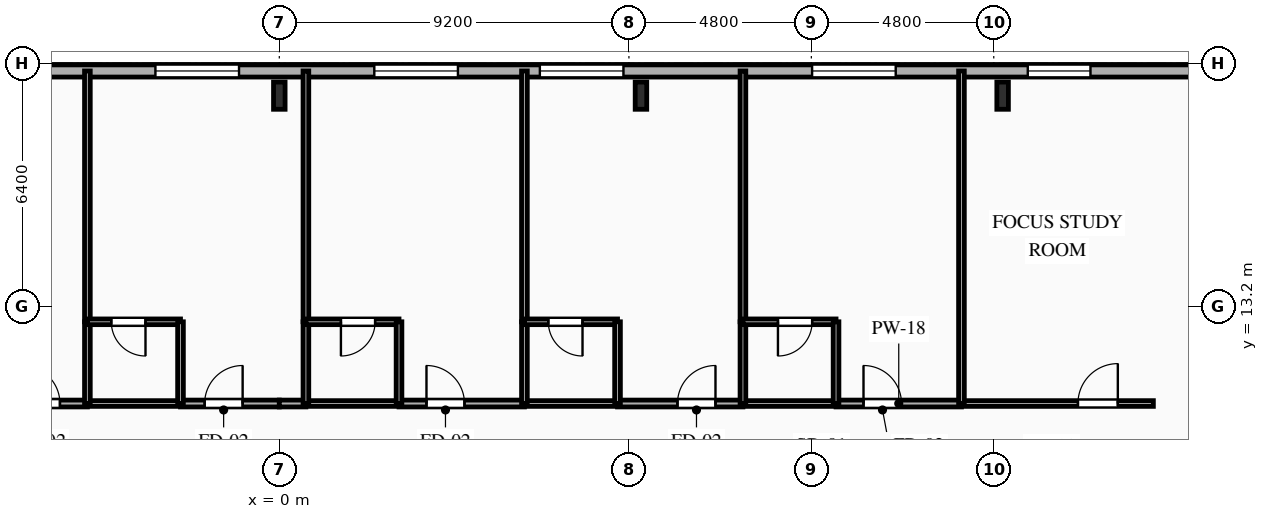
"""IFC4 building model, lengths in metres.
Left out: names, types, materials, properties, quantities, classifications, styles, units other than length and angle.
Written with IfcOpenShell. Run it as: python <this file> out.ifc"""

import sys

from ifc_helpers import new_model, si_unit, direction, frame, frame_2d, origin, origin_2d, place, context, subcontext, project, spatial, rectangle, i_section, extrude, element, fill, save


model = new_model("IFC4")
c1 = context("Model", 3, precision=1e-05, world=origin(), true_north=direction((0.0, 1.0)))
c2 = subcontext(c1, "Body", "Model", "MODEL_VIEW")
j1 = project(units=[si_unit("LENGTHUNIT", "METRE"), si_unit("PLANEANGLEUNIT", "RADIAN")], contexts=[c1])
p1 = place(None, origin())
s1 = spatial("IfcSite", under=j1, at=p1, CompositionType="ELEMENT")
p2 = place(p1, origin())
s2 = spatial("IfcBuilding", under=s1, at=p2, CompositionType="ELEMENT")
p3 = place(p2, frame((0.0, 0.0, 57.15)))
s3 = spatial("IfcBuildingStorey", under=s2, at=p3, CompositionType="ELEMENT", Elevation=57.15)
for number, where, z_axis, x_axis in (
    (1, (19.033, 18.75, 0.0), (0.0, 0.0, 1.0), (1.0, 0.0, 0.0)),
    (2, (9.517, 18.75, 0.0), (0.0, 0.0, 1.0), (1.0, 0.0, 0.0)),
    (3, (0.0, 18.75, 0.0), (0.0, 0.0, 1.0), (1.0, 0.0, 0.0)),
):
    element("IfcColumn", number, at=place(p3, frame(where, z_axis=z_axis, x_axis=x_axis)), inside=s3, PredefinedType="COLUMN", context=c2, shape_type="SweptSolid", body=[
        extrude(i_section(OverallWidth=0.304, OverallDepth=0.716, WebThickness=0.021, FlangeThickness=0.04, FilletRadius=0.027, at=origin_2d()), origin(), (0.0, 0.0, 1.0), 3.35),
    ])
p4 = place(p3, frame((-29.2, 19.4, 0.0), z_axis=(0.0, 0.0, 1.0), x_axis=(1.0, 0.0, 0.0)))
e4 = element("IfcWall", 4, at=p4, inside=s3, PredefinedType="SOLIDWALL", context=c2, shape_type="SweptSolid", body=[
    extrude(rectangle(XDim=58.4, YDim=0.32, at=frame_2d((29.2, 0.0))), origin(), (0.0, 0.0, 1.0), 3.035),
])
p5 = place(p4, frame((8.065, 0.0, 0.85)))
e5 = element("IfcOpeningElement", 5, at=p5, cuts=e4, PredefinedType="OPENING", context=c2, shape_type="SweptSolid", body=[
    extrude(rectangle(XDim=1.65, YDim=1.85, at=frame_2d((0.825, 0.925))), frame((0.0, 0.17, 0.0), z_axis=(0.0, -1.0, 0.0), x_axis=(1.0, 0.0, 0.0)), (0.0, 0.0, 1.0), 0.34),
])
p6 = place(p4, frame((15.92, 0.0, 0.85)))
e6 = element("IfcOpeningElement", 6, at=p6, cuts=e4, PredefinedType="OPENING", context=c2, shape_type="SweptSolid", body=[
    extrude(rectangle(XDim=1.6, YDim=1.85, at=frame_2d((0.8, 0.925))), frame((0.0, 0.17, 0.0), z_axis=(0.0, -1.0, 0.0), x_axis=(1.0, 0.0, 0.0)), (0.0, 0.0, 1.0), 0.34),
])
p7 = place(p4, frame((20.18, 0.0, 0.85)))
e7 = element("IfcOpeningElement", 7, at=p7, cuts=e4, PredefinedType="OPENING", context=c2, shape_type="SweptSolid", body=[
    extrude(rectangle(XDim=2.2, YDim=1.85, at=frame_2d((1.1, 0.925))), frame((0.0, 0.17, 0.0), z_axis=(0.0, -1.0, 0.0), x_axis=(1.0, 0.0, 0.0)), (0.0, 0.0, 1.0), 0.34),
])
p8 = place(p4, frame((25.94, 0.0, 0.85)))
e8 = element("IfcOpeningElement", 8, at=p8, cuts=e4, PredefinedType="OPENING", context=c2, shape_type="SweptSolid", body=[
    extrude(rectangle(XDim=2.2, YDim=1.85, at=frame_2d((1.1, 0.925))), frame((0.0, 0.17, 0.0), z_axis=(0.0, -1.0, 0.0), x_axis=(1.0, 0.0, 0.0)), (0.0, 0.0, 1.0), 0.34),
])
p9 = place(p4, frame((31.7, 0.0, 0.85)))
e9 = element("IfcOpeningElement", 9, at=p9, cuts=e4, PredefinedType="OPENING", context=c2, shape_type="SweptSolid", body=[
    extrude(rectangle(XDim=2.2, YDim=1.85, at=frame_2d((1.1, 0.925))), frame((0.0, 0.17, 0.0), z_axis=(0.0, -1.0, 0.0), x_axis=(1.0, 0.0, 0.0)), (0.0, 0.0, 1.0), 0.34),
])
p10 = place(p4, frame((36.056, 0.0, 0.85)))
e10 = element("IfcOpeningElement", 10, at=p10, cuts=e4, PredefinedType="OPENING", context=c2, shape_type="SweptSolid", body=[
    extrude(rectangle(XDim=2.2, YDim=1.85, at=frame_2d((1.1, 0.925))), frame((0.0, 0.17, 0.0), z_axis=(0.0, -1.0, 0.0), x_axis=(1.0, 0.0, 0.0)), (0.0, 0.0, 1.0), 0.34),
])
p11 = place(p4, frame((43.22, 0.0, 0.85)))
e11 = element("IfcOpeningElement", 11, at=p11, cuts=e4, PredefinedType="OPENING", context=c2, shape_type="SweptSolid", body=[
    extrude(rectangle(XDim=2.2, YDim=1.85, at=frame_2d((1.1, 0.925))), frame((0.0, 0.17, 0.0), z_axis=(0.0, -1.0, 0.0), x_axis=(1.0, 0.0, 0.0)), (0.0, 0.0, 1.0), 0.34),
])
p12 = place(p4, frame((48.895, 0.0, 0.85)))
e12 = element("IfcOpeningElement", 12, at=p12, cuts=e4, PredefinedType="OPENING", context=c2, shape_type="SweptSolid", body=[
    extrude(rectangle(XDim=1.65, YDim=1.85, at=frame_2d((0.825, 0.925))), frame((0.0, 0.17, 0.0), z_axis=(0.0, -1.0, 0.0), x_axis=(1.0, 0.0, 0.0)), (0.0, 0.0, 1.0), 0.34),
])
p13 = place(p3, frame((-8.35, 10.65, 0.0), z_axis=(0.0, 0.0, 1.0), x_axis=(1.0, 0.0, 0.0)))
e13 = element("IfcWall", 13, at=p13, inside=s3, PredefinedType="PARTITIONING", context=c2, shape_type="SweptSolid", body=[
    extrude(rectangle(XDim=3.3, YDim=0.18, at=frame_2d((1.65, 0.0))), origin(), (0.0, 0.0, 1.0), 3.035),
])
p14 = place(p13, frame((1.577, 0.0, 0.0)))
e14 = element("IfcOpeningElement", 14, at=p14, cuts=e13, PredefinedType="OPENING", context=c2, shape_type="SweptSolid", body=[
    extrude(rectangle(XDim=1.0, YDim=2.15, at=frame_2d((0.5, 1.075))), frame((0.0, 0.1, 0.0), z_axis=(0.0, -1.0, 0.0), x_axis=(1.0, 0.0, 0.0)), (0.0, 0.0, 1.0), 0.2),
])
p15 = place(p3, frame((-2.6, 10.65, 0.0), z_axis=(0.0, 0.0, 1.0), x_axis=(1.0, 0.0, 0.0)))
e15 = element("IfcWall", 15, at=p15, inside=s3, PredefinedType="PARTITIONING", context=c2, shape_type="SweptSolid", body=[
    extrude(rectangle(XDim=2.6, YDim=0.18, at=frame_2d((1.3, 0.0))), origin(), (0.0, 0.0, 1.0), 3.035),
])
p16 = place(p15, frame((0.635, 0.0, 0.0)))
e16 = element("IfcOpeningElement", 16, at=p16, cuts=e15, PredefinedType="OPENING", context=c2, shape_type="SweptSolid", body=[
    extrude(rectangle(XDim=1.0, YDim=2.15, at=frame_2d((0.5, 1.075))), frame((0.0, 0.1, 0.0), z_axis=(0.0, -1.0, 0.0), x_axis=(1.0, 0.0, 0.0)), (0.0, 0.0, 1.0), 0.2),
])
p17 = place(p3, frame((-5.05, 10.65, 0.0), z_axis=(0.0, 0.0, 1.0), x_axis=(1.0, 0.0, 0.0)))
e17 = element("IfcWall", 17, at=p17, inside=s3, PredefinedType="PLUMBINGWALL", context=c2, shape_type="SweptSolid", body=[
    extrude(rectangle(XDim=2.45, YDim=0.15, at=frame_2d((1.225, 0.0))), origin(), (0.0, 0.0, 1.0), 3.035),
])
p18 = place(p3, frame((0.0, 10.65, 0.0), z_axis=(0.0, 0.0, 1.0), x_axis=(1.0, 0.0, 0.0)))
e18 = element("IfcWall", 18, at=p18, inside=s3, PredefinedType="PARTITIONING", context=c2, shape_type="SweptSolid", body=[
    extrude(rectangle(XDim=0.7, YDim=0.18, at=frame_2d((0.35, 0.0))), origin(), (0.0, 0.0, 1.0), 3.035),
])
p19 = place(p3, frame((3.15, 10.65, 0.0), z_axis=(0.0, 0.0, 1.0), x_axis=(1.0, 0.0, 0.0)))
e19 = element("IfcWall", 19, at=p19, inside=s3, PredefinedType="PARTITIONING", context=c2, shape_type="SweptSolid", body=[
    extrude(rectangle(XDim=3.3, YDim=0.18, at=frame_2d((1.65, 0.0))), origin(), (0.0, 0.0, 1.0), 3.035),
])
p20 = place(p19, frame((0.722, 0.0, 0.0)))
e20 = element("IfcOpeningElement", 20, at=p20, cuts=e19, PredefinedType="OPENING", context=c2, shape_type="SweptSolid", body=[
    extrude(rectangle(XDim=1.0, YDim=2.15, at=frame_2d((0.5, 1.075))), frame((0.0, 0.1, 0.0), z_axis=(0.0, -1.0, 0.0), x_axis=(1.0, 0.0, 0.0)), (0.0, 0.0, 1.0), 0.2),
])
p21 = place(p3, frame((0.7, 10.65, 0.0), z_axis=(0.0, 0.0, 1.0), x_axis=(1.0, 0.0, 0.0)))
e21 = element("IfcWall", 21, at=p21, inside=s3, PredefinedType="PLUMBINGWALL", context=c2, shape_type="SweptSolid", body=[
    extrude(rectangle(XDim=2.45, YDim=0.15, at=frame_2d((1.225, 0.0))), origin(), (0.0, 0.0, 1.0), 3.035),
])
p22 = place(p3, frame((8.9, 10.65, 0.0), z_axis=(0.0, 0.0, 1.0), x_axis=(1.0, 0.0, 0.0)))
e22 = element("IfcWall", 22, at=p22, inside=s3, PredefinedType="PARTITIONING", context=c2, shape_type="SweptSolid", body=[
    extrude(rectangle(XDim=3.3, YDim=0.18, at=frame_2d((1.65, 0.0))), origin(), (0.0, 0.0, 1.0), 3.035),
])
p23 = place(p22, frame((1.577, 0.0, 0.0)))
e23 = element("IfcOpeningElement", 23, at=p23, cuts=e22, PredefinedType="OPENING", context=c2, shape_type="SweptSolid", body=[
    extrude(rectangle(XDim=1.0, YDim=2.15, at=frame_2d((0.5, 1.075))), frame((0.0, 0.1, 0.0), z_axis=(0.0, -1.0, 0.0), x_axis=(1.0, 0.0, 0.0)), (0.0, 0.0, 1.0), 0.2),
])
p24 = place(p3, frame((6.45, 10.65, 0.0), z_axis=(0.0, 0.0, 1.0), x_axis=(1.0, 0.0, 0.0)))
e24 = element("IfcWall", 24, at=p24, inside=s3, PredefinedType="PLUMBINGWALL", context=c2, shape_type="SweptSolid", body=[
    extrude(rectangle(XDim=2.45, YDim=0.15, at=frame_2d((1.225, 0.0))), origin(), (0.0, 0.0, 1.0), 3.035),
])
p25 = place(p3, frame((14.65, 10.65, 0.0), z_axis=(0.0, 0.0, 1.0), x_axis=(1.0, 0.0, 0.0)))
e25 = element("IfcWall", 25, at=p25, inside=s3, PredefinedType="PARTITIONING", context=c2, shape_type="SweptSolid", body=[
    extrude(rectangle(XDim=3.3, YDim=0.18, at=frame_2d((1.65, 0.0))), origin(), (0.0, 0.0, 1.0), 3.035),
])
p26 = place(p25, frame((0.722, 0.0, 0.0)))
e26 = element("IfcOpeningElement", 26, at=p26, cuts=e25, PredefinedType="OPENING", context=c2, shape_type="SweptSolid", body=[
    extrude(rectangle(XDim=1.0, YDim=2.15, at=frame_2d((0.5, 1.075))), frame((0.0, 0.1, 0.0), z_axis=(0.0, -1.0, 0.0), x_axis=(1.0, 0.0, 0.0)), (0.0, 0.0, 1.0), 0.2),
])
p27 = place(p3, frame((12.2, 10.65, 0.0), z_axis=(0.0, 0.0, 1.0), x_axis=(1.0, 0.0, 0.0)))
e27 = element("IfcWall", 27, at=p27, inside=s3, PredefinedType="PLUMBINGWALL", context=c2, shape_type="SweptSolid", body=[
    extrude(rectangle(XDim=2.45, YDim=0.15, at=frame_2d((1.225, 0.0))), origin(), (0.0, 0.0, 1.0), 3.035),
])
p28 = place(p3, frame((17.95, 10.65, 0.0), z_axis=(0.0, 0.0, 1.0), x_axis=(1.0, 0.0, 0.0)))
e28 = element("IfcWall", 28, at=p28, inside=s3, PredefinedType="PARTITIONING", context=c2, shape_type="SweptSolid", body=[
    extrude(rectangle(XDim=5.05, YDim=0.15, at=frame_2d((2.525, 0.0))), origin(), (0.0, 0.0, 1.0), 3.035),
])
p29 = place(p28, frame((3.065, 0.0, 0.0)))
e29 = element("IfcOpeningElement", 29, at=p29, cuts=e28, PredefinedType="OPENING", context=c2, shape_type="SweptSolid", body=[
    extrude(rectangle(XDim=1.05, YDim=2.15, at=frame_2d((0.525, 1.075))), frame((0.0, 0.085, 0.0), z_axis=(0.0, -1.0, 0.0), x_axis=(1.0, 0.0, 0.0)), (0.0, 0.0, 1.0), 0.17),
])
p30 = place(p3, frame((-5.05, 19.4, 0.0), z_axis=(0.0, 0.0, 1.0), x_axis=(0.0, -1.0, 0.0)))
e30 = element("IfcWall", 30, at=p30, inside=s3, PredefinedType="PARTITIONING", context=c2, shape_type="SweptSolid", body=[
    extrude(rectangle(XDim=6.6, YDim=0.15, at=frame_2d((3.3, 0.0))), origin(), (0.0, 0.0, 1.0), 3.035),
])
p31 = place(p3, frame((-5.05, 12.8, 0.0), z_axis=(0.0, 0.0, 1.0), x_axis=(0.0, -1.0, 0.0)))
e31 = element("IfcWall", 31, at=p31, inside=s3, PredefinedType="PLUMBINGWALL", context=c2, shape_type="SweptSolid", body=[
    extrude(rectangle(XDim=2.15, YDim=0.15, at=frame_2d((1.075, 0.0))), origin(), (0.0, 0.0, 1.0), 3.035),
])
p32 = place(p3, frame((-2.6, 12.8, 0.0), z_axis=(0.0, 0.0, 1.0), x_axis=(-1.0, 0.0, 0.0)))
e32 = element("IfcWall", 32, at=p32, inside=s3, PredefinedType="PLUMBINGWALL", context=c2, shape_type="SweptSolid", body=[
    extrude(rectangle(XDim=2.45, YDim=0.15, at=frame_2d((1.225, 0.0))), origin(), (0.0, 0.0, 1.0), 3.035),
])
p33 = place(p32, frame((0.921, 0.0, 0.0)))
e33 = element("IfcOpeningElement", 33, at=p33, cuts=e32, PredefinedType="OPENING", context=c2, shape_type="SweptSolid", body=[
    extrude(rectangle(XDim=0.9, YDim=2.1, at=frame_2d((0.45, 1.05))), frame((0.0, 0.085, 0.0), z_axis=(0.0, -1.0, 0.0), x_axis=(1.0, 0.0, 0.0)), (0.0, 0.0, 1.0), 0.17),
])
p34 = place(p3, frame((-2.6, 10.65, 0.0), z_axis=(0.0, 0.0, 1.0), x_axis=(0.0, 1.0, 0.0)))
e34 = element("IfcWall", 34, at=p34, inside=s3, PredefinedType="PLUMBINGWALL", context=c2, shape_type="SweptSolid", body=[
    extrude(rectangle(XDim=2.15, YDim=0.15, at=frame_2d((1.075, 0.0))), origin(), (0.0, 0.0, 1.0), 3.035),
])
p35 = place(p3, frame((0.7, 19.4, 0.0), z_axis=(0.0, 0.0, 1.0), x_axis=(0.0, -1.0, 0.0)))
e35 = element("IfcWall", 35, at=p35, inside=s3, PredefinedType="PARTITIONING", context=c2, shape_type="SweptSolid", body=[
    extrude(rectangle(XDim=6.6, YDim=0.15, at=frame_2d((3.3, 0.0))), origin(), (0.0, 0.0, 1.0), 3.035),
])
p36 = place(p3, frame((0.7, 12.8, 0.0), z_axis=(0.0, 0.0, 1.0), x_axis=(0.0, -1.0, 0.0)))
e36 = element("IfcWall", 36, at=p36, inside=s3, PredefinedType="PLUMBINGWALL", context=c2, shape_type="SweptSolid", body=[
    extrude(rectangle(XDim=2.15, YDim=0.15, at=frame_2d((1.075, 0.0))), origin(), (0.0, 0.0, 1.0), 3.035),
])
p37 = place(p3, frame((3.15, 12.8, 0.0), z_axis=(0.0, 0.0, 1.0), x_axis=(-1.0, 0.0, 0.0)))
e37 = element("IfcWall", 37, at=p37, inside=s3, PredefinedType="PLUMBINGWALL", context=c2, shape_type="SweptSolid", body=[
    extrude(rectangle(XDim=2.45, YDim=0.15, at=frame_2d((1.225, 0.0))), origin(), (0.0, 0.0, 1.0), 3.035),
])
p38 = place(p37, frame((0.629, 0.0, 0.0)))
e38 = element("IfcOpeningElement", 38, at=p38, cuts=e37, PredefinedType="OPENING", context=c2, shape_type="SweptSolid", body=[
    extrude(rectangle(XDim=0.9, YDim=2.1, at=frame_2d((0.45, 1.05))), frame((0.0, 0.085, 0.0), z_axis=(0.0, -1.0, 0.0), x_axis=(1.0, 0.0, 0.0)), (0.0, 0.0, 1.0), 0.17),
])
p39 = place(p3, frame((3.15, 10.65, 0.0), z_axis=(0.0, 0.0, 1.0), x_axis=(0.0, 1.0, 0.0)))
e39 = element("IfcWall", 39, at=p39, inside=s3, PredefinedType="PLUMBINGWALL", context=c2, shape_type="SweptSolid", body=[
    extrude(rectangle(XDim=2.15, YDim=0.15, at=frame_2d((1.075, 0.0))), origin(), (0.0, 0.0, 1.0), 3.035),
])
p40 = place(p3, frame((6.45, 19.4, 0.0), z_axis=(0.0, 0.0, 1.0), x_axis=(0.0, -1.0, 0.0)))
e40 = element("IfcWall", 40, at=p40, inside=s3, PredefinedType="PARTITIONING", context=c2, shape_type="SweptSolid", body=[
    extrude(rectangle(XDim=6.6, YDim=0.15, at=frame_2d((3.3, 0.0))), origin(), (0.0, 0.0, 1.0), 3.035),
])
p41 = place(p3, frame((6.45, 12.8, 0.0), z_axis=(0.0, 0.0, 1.0), x_axis=(0.0, -1.0, 0.0)))
e41 = element("IfcWall", 41, at=p41, inside=s3, PredefinedType="PLUMBINGWALL", context=c2, shape_type="SweptSolid", body=[
    extrude(rectangle(XDim=2.15, YDim=0.15, at=frame_2d((1.075, 0.0))), origin(), (0.0, 0.0, 1.0), 3.035),
])
p42 = place(p3, frame((8.9, 12.8, 0.0), z_axis=(0.0, 0.0, 1.0), x_axis=(-1.0, 0.0, 0.0)))
e42 = element("IfcWall", 42, at=p42, inside=s3, PredefinedType="PLUMBINGWALL", context=c2, shape_type="SweptSolid", body=[
    extrude(rectangle(XDim=2.45, YDim=0.15, at=frame_2d((1.225, 0.0))), origin(), (0.0, 0.0, 1.0), 3.035),
])
p43 = place(p42, frame((0.921, 0.0, 0.0)))
e43 = element("IfcOpeningElement", 43, at=p43, cuts=e42, PredefinedType="OPENING", context=c2, shape_type="SweptSolid", body=[
    extrude(rectangle(XDim=0.9, YDim=2.1, at=frame_2d((0.45, 1.05))), frame((0.0, 0.085, 0.0), z_axis=(0.0, -1.0, 0.0), x_axis=(1.0, 0.0, 0.0)), (0.0, 0.0, 1.0), 0.17),
])
p44 = place(p3, frame((8.9, 10.65, 0.0), z_axis=(0.0, 0.0, 1.0), x_axis=(0.0, 1.0, 0.0)))
e44 = element("IfcWall", 44, at=p44, inside=s3, PredefinedType="PLUMBINGWALL", context=c2, shape_type="SweptSolid", body=[
    extrude(rectangle(XDim=2.15, YDim=0.15, at=frame_2d((1.075, 0.0))), origin(), (0.0, 0.0, 1.0), 3.035),
])
p45 = place(p3, frame((12.2, 19.4, 0.0), z_axis=(0.0, 0.0, 1.0), x_axis=(0.0, -1.0, 0.0)))
e45 = element("IfcWall", 45, at=p45, inside=s3, PredefinedType="PARTITIONING", context=c2, shape_type="SweptSolid", body=[
    extrude(rectangle(XDim=6.6, YDim=0.15, at=frame_2d((3.3, 0.0))), origin(), (0.0, 0.0, 1.0), 3.035),
])
p46 = place(p3, frame((12.2, 12.8, 0.0), z_axis=(0.0, 0.0, 1.0), x_axis=(0.0, -1.0, 0.0)))
e46 = element("IfcWall", 46, at=p46, inside=s3, PredefinedType="PLUMBINGWALL", context=c2, shape_type="SweptSolid", body=[
    extrude(rectangle(XDim=2.15, YDim=0.15, at=frame_2d((1.075, 0.0))), origin(), (0.0, 0.0, 1.0), 3.035),
])
p47 = place(p3, frame((14.65, 12.8, 0.0), z_axis=(0.0, 0.0, 1.0), x_axis=(-1.0, 0.0, 0.0)))
e47 = element("IfcWall", 47, at=p47, inside=s3, PredefinedType="PLUMBINGWALL", context=c2, shape_type="SweptSolid", body=[
    extrude(rectangle(XDim=2.45, YDim=0.15, at=frame_2d((1.225, 0.0))), origin(), (0.0, 0.0, 1.0), 3.035),
])
p48 = place(p47, frame((0.629, 0.0, 0.0)))
e48 = element("IfcOpeningElement", 48, at=p48, cuts=e47, PredefinedType="OPENING", context=c2, shape_type="SweptSolid", body=[
    extrude(rectangle(XDim=0.9, YDim=2.1, at=frame_2d((0.45, 1.05))), frame((0.0, 0.085, 0.0), z_axis=(0.0, -1.0, 0.0), x_axis=(1.0, 0.0, 0.0)), (0.0, 0.0, 1.0), 0.17),
])
p49 = place(p3, frame((14.65, 10.65, 0.0), z_axis=(0.0, 0.0, 1.0), x_axis=(0.0, 1.0, 0.0)))
e49 = element("IfcWall", 49, at=p49, inside=s3, PredefinedType="PLUMBINGWALL", context=c2, shape_type="SweptSolid", body=[
    extrude(rectangle(XDim=2.15, YDim=0.15, at=frame_2d((1.075, 0.0))), origin(), (0.0, 0.0, 1.0), 3.035),
])
p50 = place(p3, frame((17.95, 19.4, 0.0), z_axis=(0.0, 0.0, 1.0), x_axis=(0.0, -1.0, 0.0)))
e50 = element("IfcWall", 50, at=p50, inside=s3, PredefinedType="PARTITIONING", context=c2, shape_type="SweptSolid", body=[
    extrude(rectangle(XDim=8.75, YDim=0.15, at=frame_2d((4.375, 0.0))), origin(), (0.0, 0.0, 1.0), 3.035),
])
p51 = place(p8, origin())
e51 = element("IfcWindow", 51, at=p51, inside=s3, PartitioningType="SINGLE_PANEL", PredefinedType="WINDOW", context=c2, shape_type="SweptSolid", body=[
    extrude(rectangle(XDim=2.2, YDim=1.85, at=frame_2d((1.1, 0.925))), frame((0.0, 0.03, 0.0), z_axis=(0.0, -1.0, 0.0), x_axis=(1.0, 0.0, 0.0)), (0.0, 0.0, 1.0), 0.06),
])
fill(e8, e51)
p52 = place(p9, origin())
e52 = element("IfcWindow", 52, at=p52, inside=s3, PartitioningType="SINGLE_PANEL", PredefinedType="WINDOW", context=c2, shape_type="SweptSolid", body=[
    extrude(rectangle(XDim=2.2, YDim=1.85, at=frame_2d((1.1, 0.925))), frame((0.0, 0.03, 0.0), z_axis=(0.0, -1.0, 0.0), x_axis=(1.0, 0.0, 0.0)), (0.0, 0.0, 1.0), 0.06),
])
fill(e9, e52)
p53 = place(p10, origin())
e53 = element("IfcWindow", 53, at=p53, inside=s3, PartitioningType="SINGLE_PANEL", PredefinedType="WINDOW", context=c2, shape_type="SweptSolid", body=[
    extrude(rectangle(XDim=2.2, YDim=1.85, at=frame_2d((1.1, 0.925))), frame((0.0, 0.03, 0.0), z_axis=(0.0, -1.0, 0.0), x_axis=(1.0, 0.0, 0.0)), (0.0, 0.0, 1.0), 0.06),
])
fill(e10, e53)
p54 = place(p11, origin())
e54 = element("IfcWindow", 54, at=p54, inside=s3, PartitioningType="SINGLE_PANEL", PredefinedType="WINDOW", context=c2, shape_type="SweptSolid", body=[
    extrude(rectangle(XDim=2.2, YDim=1.85, at=frame_2d((1.1, 0.925))), frame((0.0, 0.03, 0.0), z_axis=(0.0, -1.0, 0.0), x_axis=(1.0, 0.0, 0.0)), (0.0, 0.0, 1.0), 0.06),
])
fill(e11, e54)
p55 = place(p12, origin())
e55 = element("IfcWindow", 55, at=p55, inside=s3, PartitioningType="SINGLE_PANEL", PredefinedType="WINDOW", context=c2, shape_type="SweptSolid", body=[
    extrude(rectangle(XDim=1.65, YDim=1.85, at=frame_2d((0.825, 0.925))), frame((0.0, 0.03, 0.0), z_axis=(0.0, -1.0, 0.0), x_axis=(1.0, 0.0, 0.0)), (0.0, 0.0, 1.0), 0.06),
])
fill(e12, e55)
p56 = place(p14, origin())
e56 = element("IfcDoor", 56, at=p56, inside=s3, OperationType="SINGLE_SWING_LEFT", PredefinedType="DOOR", context=c2, shape_type="SweptSolid", body=[
    extrude(rectangle(XDim=1.0, YDim=2.15, at=frame_2d((0.5, 1.075))), frame((0.0, 0.025, 0.0), z_axis=(0.0, -1.0, 0.0), x_axis=(1.0, 0.0, 0.0)), (0.0, 0.0, 1.0), 0.05),
])
fill(e14, e56)
p57 = place(p16, origin())
e57 = element("IfcDoor", 57, at=p57, inside=s3, OperationType="SINGLE_SWING_RIGHT", PredefinedType="DOOR", context=c2, shape_type="SweptSolid", body=[
    extrude(rectangle(XDim=1.0, YDim=2.15, at=frame_2d((0.5, 1.075))), frame((0.0, 0.025, 0.0), z_axis=(0.0, -1.0, 0.0), x_axis=(1.0, 0.0, 0.0)), (0.0, 0.0, 1.0), 0.05),
])
fill(e16, e57)
p58 = place(p20, origin())
e58 = element("IfcDoor", 58, at=p58, inside=s3, OperationType="SINGLE_SWING_LEFT", PredefinedType="DOOR", context=c2, shape_type="SweptSolid", body=[
    extrude(rectangle(XDim=1.0, YDim=2.15, at=frame_2d((0.5, 1.075))), frame((0.0, 0.025, 0.0), z_axis=(0.0, -1.0, 0.0), x_axis=(1.0, 0.0, 0.0)), (0.0, 0.0, 1.0), 0.05),
])
fill(e20, e58)
p59 = place(p23, origin())
e59 = element("IfcDoor", 59, at=p59, inside=s3, OperationType="SINGLE_SWING_RIGHT", PredefinedType="DOOR", context=c2, shape_type="SweptSolid", body=[
    extrude(rectangle(XDim=1.0, YDim=2.15, at=frame_2d((0.5, 1.075))), frame((0.0, 0.025, 0.0), z_axis=(0.0, -1.0, 0.0), x_axis=(1.0, 0.0, 0.0)), (0.0, 0.0, 1.0), 0.05),
])
fill(e23, e59)
p60 = place(p26, origin())
e60 = element("IfcDoor", 60, at=p60, inside=s3, OperationType="SINGLE_SWING_LEFT", PredefinedType="DOOR", context=c2, shape_type="SweptSolid", body=[
    extrude(rectangle(XDim=1.0, YDim=2.15, at=frame_2d((0.5, 1.075))), frame((0.0, 0.025, 0.0), z_axis=(0.0, -1.0, 0.0), x_axis=(1.0, 0.0, 0.0)), (0.0, 0.0, 1.0), 0.05),
])
fill(e26, e60)
p61 = place(p29, origin())
e61 = element("IfcDoor", 61, at=p61, inside=s3, OperationType="SINGLE_SWING_RIGHT", PredefinedType="DOOR", context=c2, shape_type="SweptSolid", body=[
    extrude(rectangle(XDim=1.05, YDim=2.15, at=frame_2d((0.525, 1.075))), frame((0.0, 0.025, 0.0), z_axis=(0.0, -1.0, 0.0), x_axis=(1.0, 0.0, 0.0)), (0.0, 0.0, 1.0), 0.05),
])
fill(e29, e61)
p62 = place(p33, origin())
e62 = element("IfcDoor", 62, at=p62, inside=s3, OperationType="SINGLE_SWING_LEFT", PredefinedType="DOOR", context=c2, shape_type="SweptSolid", body=[
    extrude(rectangle(XDim=0.9, YDim=2.1, at=frame_2d((0.45, 1.05))), frame((0.0, 0.025, 0.0), z_axis=(0.0, -1.0, 0.0), x_axis=(1.0, 0.0, 0.0)), (0.0, 0.0, 1.0), 0.05),
])
fill(e33, e62)
p63 = place(p38, origin())
e63 = element("IfcDoor", 63, at=p63, inside=s3, OperationType="SINGLE_SWING_RIGHT", PredefinedType="DOOR", context=c2, shape_type="SweptSolid", body=[
    extrude(rectangle(XDim=0.9, YDim=2.1, at=frame_2d((0.45, 1.05))), frame((0.0, 0.025, 0.0), z_axis=(0.0, -1.0, 0.0), x_axis=(1.0, 0.0, 0.0)), (0.0, 0.0, 1.0), 0.05),
])
fill(e38, e63)
p64 = place(p43, origin())
e64 = element("IfcDoor", 64, at=p64, inside=s3, OperationType="SINGLE_SWING_LEFT", PredefinedType="DOOR", context=c2, shape_type="SweptSolid", body=[
    extrude(rectangle(XDim=0.9, YDim=2.1, at=frame_2d((0.45, 1.05))), frame((0.0, 0.025, 0.0), z_axis=(0.0, -1.0, 0.0), x_axis=(1.0, 0.0, 0.0)), (0.0, 0.0, 1.0), 0.05),
])
fill(e43, e64)
p65 = place(p48, origin())
e65 = element("IfcDoor", 65, at=p65, inside=s3, OperationType="SINGLE_SWING_RIGHT", PredefinedType="DOOR", context=c2, shape_type="SweptSolid", body=[
    extrude(rectangle(XDim=0.9, YDim=2.1, at=frame_2d((0.45, 1.05))), frame((0.0, 0.025, 0.0), z_axis=(0.0, -1.0, 0.0), x_axis=(1.0, 0.0, 0.0)), (0.0, 0.0, 1.0), 0.05),
])
fill(e48, e65)
save(model, sys.argv[1])
